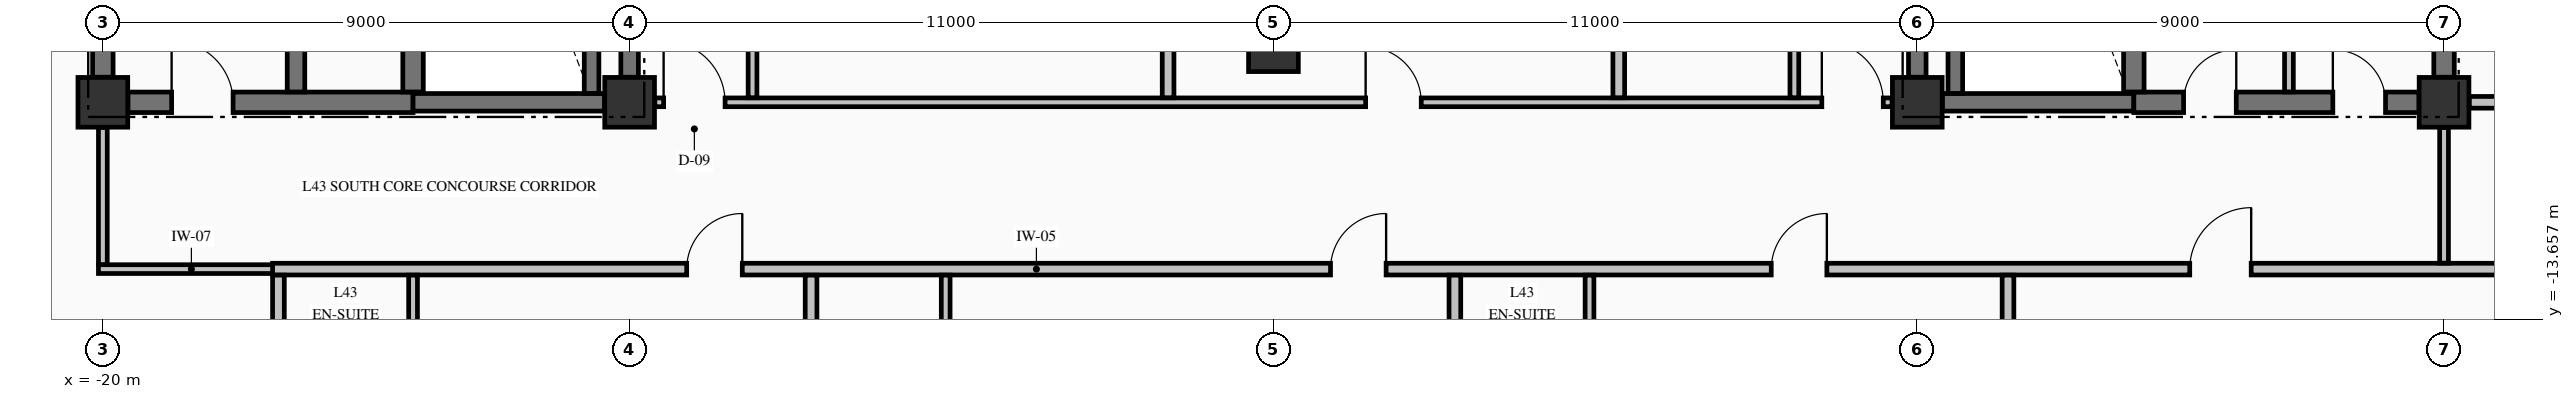
"""IFC4 building model, lengths in metres.
Left out: names, types, materials, properties, quantities, classifications, styles, units other than length and angle.
Written with IfcOpenShell. Run it as: python <this file> out.ifc"""

import sys

from ifc_helpers import new_model, si_unit, direction, frame, frame_2d, origin, origin_2d, place, context, subcontext, project, spatial, rectangle, extrude, element, fill, save


model = new_model("IFC4")
c1 = context("Model", 3, precision=1e-05, world=origin(), true_north=direction((0.0, 1.0)))
c2 = subcontext(c1, "Body", "Model", "MODEL_VIEW")
j1 = project(units=[si_unit("LENGTHUNIT", "METRE"), si_unit("PLANEANGLEUNIT", "RADIAN")], contexts=[c1])
p1 = place(None, origin())
s1 = spatial("IfcSite", under=j1, at=p1, CompositionType="ELEMENT")
p2 = place(p1, origin())
s2 = spatial("IfcBuilding", under=s1, at=p2, CompositionType="ELEMENT")
p3 = place(p2, frame((0.0, 0.0, 169.46)))
s3 = spatial("IfcBuildingStorey", under=s2, at=p3, CompositionType="ELEMENT", Elevation=169.46)
for number, where, z_axis, x_axis in (
    (1, (-20.0, -9.95, -0.25), (0.0, 0.0, 1.0), (1.0, 0.0, 0.0)),
    (2, (-11.0, -9.95, -0.25), (0.0, 0.0, 1.0), (1.0, 0.0, 0.0)),
    (3, (11.0, -9.95, -0.25), (0.0, 0.0, 1.0), (1.0, 0.0, 0.0)),
    (4, (20.0, -9.95, -0.25), (0.0, 0.0, 1.0), (1.0, 0.0, 0.0)),
    (5, (0.0, -9.0, -0.25), (0.0, 0.0, 1.0), (1.0, 0.0, 0.0)),
):
    element("IfcColumn", number, at=place(p3, frame(where, z_axis=z_axis, x_axis=x_axis)), inside=s3, PredefinedType="COLUMN", context=c2, shape_type="SweptSolid", body=[
        extrude(rectangle(XDim=0.85, YDim=0.85, at=origin_2d()), origin(), (0.0, 0.0, 1.0), 3.4),
    ])
p4 = place(p3, frame((-19.571, -9.95, 0.0), z_axis=(0.0, 0.0, 1.0), x_axis=(1.0, 0.0, 0.0)))
e6 = element("IfcWall", 6, at=p4, inside=s3, PredefinedType="SHEAR", context=c2, shape_type="SweptSolid", body=[
    extrude(rectangle(XDim=4.871, YDim=0.35, at=frame_2d((2.436, 0.0))), origin(), (0.0, 0.0, 1.0), 3.15),
])
p5 = place(p4, frame((0.746, 0.0, 0.0)))
e7 = element("IfcOpeningElement", 7, at=p5, cuts=e6, PredefinedType="OPENING", context=c2, shape_type="SweptSolid", body=[
    extrude(rectangle(XDim=1.05, YDim=2.15, at=frame_2d((0.525, 1.075))), frame((0.0, 0.185, 0.0), z_axis=(0.0, -1.0, 0.0), x_axis=(1.0, 0.0, 0.0)), (0.0, 0.0, 1.0), 0.37),
])
for number, where, z_axis, x_axis in (
    (8, (-14.7, -9.95, 0.0), (0.0, 0.0, 1.0), (1.0, 0.0, 0.0)),
    (9, (11.429, -9.95, 0.0), (0.0, 0.0, 1.0), (1.0, 0.0, 0.0)),
):
    element("IfcWall", number, at=place(p3, frame(where, z_axis=z_axis, x_axis=x_axis)), inside=s3, PredefinedType="SHEAR", context=c2, shape_type="SweptSolid", body=[
        extrude(rectangle(XDim=3.271, YDim=0.3, at=frame_2d((1.635, 0.0))), origin(), (0.0, 0.0, 1.0), 3.15),
    ])
p6 = place(p3, frame((14.7, -9.95, 0.0), z_axis=(0.0, 0.0, 1.0), x_axis=(1.0, 0.0, 0.0)))
e10 = element("IfcWall", 10, at=p6, inside=s3, PredefinedType="SHEAR", context=c2, shape_type="SweptSolid", body=[
    extrude(rectangle(XDim=4.871, YDim=0.35, at=frame_2d((2.436, 0.0))), origin(), (0.0, 0.0, 1.0), 3.15),
])
p7 = place(p6, frame((0.85, 0.0, 0.0)))
e11 = element("IfcOpeningElement", 11, at=p7, cuts=e10, PredefinedType="OPENING", context=c2, shape_type="SweptSolid", body=[
    extrude(rectangle(XDim=0.9, YDim=2.15, at=frame_2d((0.45, 1.075))), frame((0.0, 0.185, 0.0), z_axis=(0.0, -1.0, 0.0), x_axis=(1.0, 0.0, 0.0)), (0.0, 0.0, 1.0), 0.37),
])
p8 = place(p6, frame((3.4, 0.0, 0.0)))
e12 = element("IfcOpeningElement", 12, at=p8, cuts=e10, PredefinedType="OPENING", context=c2, shape_type="SweptSolid", body=[
    extrude(rectangle(XDim=0.9, YDim=2.15, at=frame_2d((0.45, 1.075))), frame((0.0, 0.185, 0.0), z_axis=(0.0, -1.0, 0.0), x_axis=(1.0, 0.0, 0.0)), (0.0, 0.0, 1.0), 0.37),
])
p9 = place(p3, frame((-20.075, -12.8, 0.0), z_axis=(0.0, 0.0, 1.0), x_axis=(1.0, 0.0, 0.0)))
e13 = element("IfcWall", 13, at=p9, inside=s3, PredefinedType="PARTITIONING", context=c2, shape_type="SweptSolid", body=[
    extrude(rectangle(XDim=3.175, YDim=0.15, at=frame_2d((1.587, 0.0))), origin(), (0.0, 0.0, 1.0), 3.15),
])
p10 = place(p3, frame((-17.1, -12.8, 0.0), z_axis=(0.0, 0.0, 1.0), x_axis=(1.0, 0.0, 0.0)))
e14 = element("IfcWall", 14, at=p10, inside=s3, PredefinedType="PARTITIONING", context=c2, shape_type="SweptSolid", body=[
    extrude(rectangle(XDim=39.2, YDim=0.2, at=frame_2d((19.6, 0.0))), origin(), (0.0, 0.0, 1.0), 3.15),
])
p11 = place(p10, frame((7.075, 0.0, 0.0)))
e15 = element("IfcOpeningElement", 15, at=p11, cuts=e14, PredefinedType="OPENING", context=c2, shape_type="SweptSolid", body=[
    extrude(rectangle(XDim=0.95, YDim=2.15, at=frame_2d((0.475, 1.075))), frame((0.0, 0.11, 0.0), z_axis=(0.0, -1.0, 0.0), x_axis=(1.0, 0.0, 0.0)), (0.0, 0.0, 1.0), 0.22),
])
p12 = place(p10, frame((18.075, 0.0, 0.0)))
e16 = element("IfcOpeningElement", 16, at=p12, cuts=e14, PredefinedType="OPENING", context=c2, shape_type="SweptSolid", body=[
    extrude(rectangle(XDim=0.95, YDim=2.15, at=frame_2d((0.475, 1.075))), frame((0.0, 0.11, 0.0), z_axis=(0.0, -1.0, 0.0), x_axis=(1.0, 0.0, 0.0)), (0.0, 0.0, 1.0), 0.22),
])
p13 = place(p10, frame((25.605, 0.0, 0.0)))
e17 = element("IfcOpeningElement", 17, at=p13, cuts=e14, PredefinedType="OPENING", context=c2, shape_type="SweptSolid", body=[
    extrude(rectangle(XDim=0.95, YDim=2.15, at=frame_2d((0.475, 1.075))), frame((0.0, 0.11, 0.0), z_axis=(0.0, -1.0, 0.0), x_axis=(1.0, 0.0, 0.0)), (0.0, 0.0, 1.0), 0.22),
])
p14 = place(p10, frame((32.755, 0.0, 0.0)))
e18 = element("IfcOpeningElement", 18, at=p14, cuts=e14, PredefinedType="OPENING", context=c2, shape_type="SweptSolid", body=[
    extrude(rectangle(XDim=1.05, YDim=2.15, at=frame_2d((0.525, 1.075))), frame((0.0, 0.11, 0.0), z_axis=(0.0, -1.0, 0.0), x_axis=(1.0, 0.0, 0.0)), (0.0, 0.0, 1.0), 0.22),
])
p15 = place(p3, frame((-10.569, -9.95, 0.0), z_axis=(0.0, 0.0, 1.0), x_axis=(1.0, 0.0, 0.0)))
e19 = element("IfcWall", 19, at=p15, inside=s3, PredefinedType="PARTITIONING", context=c2, shape_type="SweptSolid", body=[
    extrude(rectangle(XDim=21.138, YDim=0.15, at=frame_2d((10.569, 0.0))), origin(), (0.0, 0.0, 1.0), 3.15),
])
p16 = place(p15, frame((0.15, 0.0, 0.0)))
e20 = element("IfcOpeningElement", 20, at=p16, cuts=e19, PredefinedType="OPENING", context=c2, shape_type="SweptSolid", body=[
    extrude(rectangle(XDim=1.05, YDim=2.15, at=frame_2d((0.525, 1.075))), frame((0.0, 0.085, 0.0), z_axis=(0.0, -1.0, 0.0), x_axis=(1.0, 0.0, 0.0)), (0.0, 0.0, 1.0), 0.17),
])
p17 = place(p15, frame((19.938, 0.0, 0.0)))
e21 = element("IfcOpeningElement", 21, at=p17, cuts=e19, PredefinedType="OPENING", context=c2, shape_type="SweptSolid", body=[
    extrude(rectangle(XDim=1.05, YDim=2.15, at=frame_2d((0.525, 1.075))), frame((0.0, 0.085, 0.0), z_axis=(0.0, -1.0, 0.0), x_axis=(1.0, 0.0, 0.0)), (0.0, 0.0, 1.0), 0.17),
])
p18 = place(p15, frame((12.144, 0.0, 0.0)))
e22 = element("IfcOpeningElement", 22, at=p18, cuts=e19, PredefinedType="OPENING", context=c2, shape_type="SweptSolid", body=[
    extrude(rectangle(XDim=0.95, YDim=2.15, at=frame_2d((0.475, 1.075))), frame((0.0, 0.085, 0.0), z_axis=(0.0, -1.0, 0.0), x_axis=(1.0, 0.0, 0.0)), (0.0, 0.0, 1.0), 0.17),
])
p19 = place(p3, frame((20.431, -9.95, 0.0), z_axis=(0.0, 0.0, 1.0), x_axis=(1.0, 0.0, 0.0)))
e23 = element("IfcWall", 23, at=p19, inside=s3, PredefinedType="PARTITIONING", context=c2, shape_type="SweptSolid", body=[
    extrude(rectangle(XDim=6.404, YDim=0.2, at=frame_2d((3.202, 0.0))), origin(), (0.0, 0.0, 1.0), 3.15),
])
p20 = place(p3, frame((-20.0, -9.521, 0.0), z_axis=(0.0, 0.0, 1.0), x_axis=(0.0, 1.0, 0.0)))
e24 = element("IfcWall", 24, at=p20, inside=s3, PredefinedType="SHEAR", context=c2, shape_type="SweptSolid", body=[
    extrude(rectangle(XDim=9.092, YDim=0.35, at=frame_2d((4.546, 0.0))), origin(), (0.0, 0.0, 1.0), 3.15),
])
p21 = place(p3, frame((-16.7, -9.773, 0.0), z_axis=(0.0, 0.0, 1.0), x_axis=(0.0, 1.0, 0.0)))
e25 = element("IfcWall", 25, at=p21, inside=s3, PredefinedType="SHEAR", context=c2, shape_type="SweptSolid", body=[
    extrude(rectangle(XDim=9.371, YDim=0.3, at=frame_2d((4.686, 0.0))), origin(), (0.0, 0.0, 1.0), 3.15),
])
p22 = place(p3, frame((-14.7, -9.773, 0.0), z_axis=(0.0, 0.0, 1.0), x_axis=(0.0, 1.0, 0.0)))
e26 = element("IfcWall", 26, at=p22, inside=s3, PredefinedType="SHEAR", context=c2, shape_type="SweptSolid", body=[
    extrude(rectangle(XDim=9.371, YDim=0.35, at=frame_2d((4.686, 0.0))), origin(), (0.0, 0.0, 1.0), 3.15),
])
p23 = place(p3, frame((-11.65, -9.798, 0.0), z_axis=(0.0, 0.0, 1.0), x_axis=(0.0, 1.0, 0.0)))
e27 = element("IfcWall", 27, at=p23, inside=s3, PredefinedType="SOLIDWALL", context=c2, shape_type="SweptSolid", body=[
    extrude(rectangle(XDim=9.396, YDim=0.25, at=frame_2d((4.698, 0.0))), origin(), (0.0, 0.0, 1.0), 3.15),
])
for number, where, z_axis, x_axis in (
    (28, (-11.0, -9.521, 0.0), (0.0, 0.0, 1.0), (0.0, 1.0, 0.0)),
    (29, (11.0, -9.521, 0.0), (0.0, 0.0, 1.0), (0.0, 1.0, 0.0)),
):
    element("IfcWall", number, at=place(p3, frame(where, z_axis=z_axis, x_axis=x_axis)), inside=s3, PredefinedType="SHEAR", context=c2, shape_type="SweptSolid", body=[
        extrude(rectangle(XDim=9.092, YDim=0.3, at=frame_2d((4.546, 0.0))), origin(), (0.0, 0.0, 1.0), 3.15),
    ])
p24 = place(p3, frame((11.65, -9.798, 0.0), z_axis=(0.0, 0.0, 1.0), x_axis=(0.0, 1.0, 0.0)))
e30 = element("IfcWall", 30, at=p24, inside=s3, PredefinedType="SOLIDWALL", context=c2, shape_type="SweptSolid", body=[
    extrude(rectangle(XDim=9.396, YDim=0.25, at=frame_2d((4.698, 0.0))), origin(), (0.0, 0.0, 1.0), 3.15),
])
p25 = place(p3, frame((14.7, -9.773, 0.0), z_axis=(0.0, 0.0, 1.0), x_axis=(0.0, 1.0, 0.0)))
e31 = element("IfcWall", 31, at=p25, inside=s3, PredefinedType="SHEAR", context=c2, shape_type="SweptSolid", body=[
    extrude(rectangle(XDim=9.371, YDim=0.35, at=frame_2d((4.686, 0.0))), origin(), (0.0, 0.0, 1.0), 3.15),
])
p26 = place(p3, frame((20.0, -9.521, 0.0), z_axis=(0.0, 0.0, 1.0), x_axis=(0.0, 1.0, 0.0)))
e32 = element("IfcWall", 32, at=p26, inside=s3, PredefinedType="SHEAR", context=c2, shape_type="SweptSolid", body=[
    extrude(rectangle(XDim=9.092, YDim=0.35, at=frame_2d((4.546, 0.0))), origin(), (0.0, 0.0, 1.0), 3.15),
])
p27 = place(p3, frame((-20.0, -12.722, 0.0), z_axis=(0.0, 0.0, 1.0), x_axis=(0.0, 1.0, 0.0)))
e33 = element("IfcWall", 33, at=p27, inside=s3, PredefinedType="PARTITIONING", context=c2, shape_type="SweptSolid", body=[
    extrude(rectangle(XDim=2.341, YDim=0.15, at=frame_2d((1.17, 0.0))), origin(), (0.0, 0.0, 1.0), 2.342),
])
p28 = place(p3, frame((-17.0, -15.672, 0.0), z_axis=(0.0, 0.0, 1.0), x_axis=(0.0, 1.0, 0.0)))
e34 = element("IfcWall", 34, at=p28, inside=s3, PredefinedType="PARTITIONING", context=c2, shape_type="SweptSolid", body=[
    extrude(rectangle(XDim=2.769, YDim=0.2, at=frame_2d((1.385, 0.0))), origin(), (0.0, 0.0, 1.0), 3.15),
])
p29 = place(p3, frame((-14.7, -15.672, 0.0), z_axis=(0.0, 0.0, 1.0), x_axis=(0.0, 1.0, 0.0)))
e35 = element("IfcWall", 35, at=p29, inside=s3, PredefinedType="PARTITIONING", context=c2, shape_type="SweptSolid", body=[
    extrude(rectangle(XDim=2.769, YDim=0.15, at=frame_2d((1.385, 0.0))), origin(), (0.0, 0.0, 1.0), 3.15),
])
p30 = place(p3, frame((-8.9, -9.872, 0.0), z_axis=(0.0, 0.0, 1.0), x_axis=(0.0, 1.0, 0.0)))
e36 = element("IfcWall", 36, at=p30, inside=s3, PredefinedType="PARTITIONING", context=c2, shape_type="SweptSolid", body=[
    extrude(rectangle(XDim=7.169, YDim=0.15, at=frame_2d((3.584, 0.0))), origin(), (0.0, 0.0, 1.0), 3.15),
])
p31 = place(p30, frame((3.102, 0.0, 0.0)))
e37 = element("IfcOpeningElement", 37, at=p31, cuts=e36, PredefinedType="OPENING", context=c2, shape_type="SweptSolid", body=[
    extrude(rectangle(XDim=1.0, YDim=2.15, at=frame_2d((0.5, 1.075))), frame((0.0, 0.085, 0.0), z_axis=(0.0, -1.0, 0.0), x_axis=(1.0, 0.0, 0.0)), (0.0, 0.0, 1.0), 0.17),
])
p32 = place(p3, frame((-7.9, -14.972, 0.0), z_axis=(0.0, 0.0, 1.0), x_axis=(0.0, 1.0, 0.0)))
e38 = element("IfcWall", 38, at=p32, inside=s3, PredefinedType="PARTITIONING", context=c2, shape_type="SweptSolid", body=[
    extrude(rectangle(XDim=2.069, YDim=0.2, at=frame_2d((1.034, 0.0))), origin(), (0.0, 0.0, 1.0), 3.15),
])
p33 = place(p3, frame((-5.6, -14.972, 0.0), z_axis=(0.0, 0.0, 1.0), x_axis=(0.0, 1.0, 0.0)))
e39 = element("IfcWall", 39, at=p33, inside=s3, PredefinedType="PARTITIONING", context=c2, shape_type="SweptSolid", body=[
    extrude(rectangle(XDim=2.069, YDim=0.15, at=frame_2d((1.034, 0.0))), origin(), (0.0, 0.0, 1.0), 3.15),
])
p34 = place(p3, frame((-1.8, -9.872, 0.0), z_axis=(0.0, 0.0, 1.0), x_axis=(0.0, 1.0, 0.0)))
e40 = element("IfcWall", 40, at=p34, inside=s3, PredefinedType="PARTITIONING", context=c2, shape_type="SweptSolid", body=[
    extrude(rectangle(XDim=4.569, YDim=0.2, at=frame_2d((2.285, 0.0))), origin(), (0.0, 0.0, 1.0), 3.15),
])
p35 = place(p3, frame((3.1, -15.672, 0.0), z_axis=(0.0, 0.0, 1.0), x_axis=(0.0, 1.0, 0.0)))
e41 = element("IfcWall", 41, at=p35, inside=s3, PredefinedType="PARTITIONING", context=c2, shape_type="SweptSolid", body=[
    extrude(rectangle(XDim=2.769, YDim=0.2, at=frame_2d((1.385, 0.0))), origin(), (0.0, 0.0, 1.0), 3.15),
])
p36 = place(p3, frame((5.4, -15.672, 0.0), z_axis=(0.0, 0.0, 1.0), x_axis=(0.0, 1.0, 0.0)))
e42 = element("IfcWall", 42, at=p36, inside=s3, PredefinedType="PARTITIONING", context=c2, shape_type="SweptSolid", body=[
    extrude(rectangle(XDim=2.769, YDim=0.15, at=frame_2d((1.385, 0.0))), origin(), (0.0, 0.0, 1.0), 3.15),
])
p37 = place(p3, frame((5.9, -9.872, 0.0), z_axis=(0.0, 0.0, 1.0), x_axis=(0.0, 1.0, 0.0)))
e43 = element("IfcWall", 43, at=p37, inside=s3, PredefinedType="PARTITIONING", context=c2, shape_type="SweptSolid", body=[
    extrude(rectangle(XDim=4.569, YDim=0.2, at=frame_2d((2.285, 0.0))), origin(), (0.0, 0.0, 1.0), 3.15),
])
p38 = place(p3, frame((8.9, -9.872, 0.0), z_axis=(0.0, 0.0, 1.0), x_axis=(0.0, 1.0, 0.0)))
e44 = element("IfcWall", 44, at=p38, inside=s3, PredefinedType="PARTITIONING", context=c2, shape_type="SweptSolid", body=[
    extrude(rectangle(XDim=4.569, YDim=0.15, at=frame_2d((2.285, 0.0))), origin(), (0.0, 0.0, 1.0), 3.15),
])
p39 = place(p38, frame((1.847, 0.0, 0.0)))
e45 = element("IfcOpeningElement", 45, at=p39, cuts=e44, PredefinedType="OPENING", context=c2, shape_type="SweptSolid", body=[
    extrude(rectangle(XDim=0.95, YDim=2.15, at=frame_2d((0.475, 1.075))), frame((0.0, 0.085, 0.0), z_axis=(0.0, -1.0, 0.0), x_axis=(1.0, 0.0, 0.0)), (0.0, 0.0, 1.0), 0.17),
])
p40 = place(p3, frame((12.55, -24.335, 0.0), z_axis=(0.0, 0.0, 1.0), x_axis=(0.0, 1.0, 0.0)))
e46 = element("IfcWall", 46, at=p40, inside=s3, PredefinedType="PARTITIONING", context=c2, shape_type="SweptSolid", body=[
    extrude(rectangle(XDim=11.432, YDim=0.2, at=frame_2d((5.716, 0.0))), origin(), (0.0, 0.0, 1.0), 3.15),
])
p41 = place(p3, frame((17.35, -9.772, 0.0), z_axis=(0.0, 0.0, 1.0), x_axis=(0.0, 1.0, 0.0)))
e47 = element("IfcWall", 47, at=p41, inside=s3, PredefinedType="PARTITIONING", context=c2, shape_type="SweptSolid", body=[
    extrude(rectangle(XDim=14.494, YDim=0.15, at=frame_2d((7.247, 0.0))), origin(), (0.0, 0.0, 1.0), 3.15),
])
p42 = place(p3, frame((20.0, -12.697, 0.0), z_axis=(0.0, 0.0, 1.0), x_axis=(0.0, 1.0, 0.0)))
e48 = element("IfcWall", 48, at=p42, inside=s3, PredefinedType="PARTITIONING", context=c2, shape_type="SweptSolid", body=[
    extrude(rectangle(XDim=2.316, YDim=0.15, at=frame_2d((1.158, 0.0))), origin(), (0.0, 0.0, 1.0), 2.342),
])
p43 = place(p5, origin())
e49 = element("IfcDoor", 49, at=p43, inside=s3, OperationType="SINGLE_SWING_LEFT", PredefinedType="DOOR", context=c2, shape_type="SweptSolid", body=[
    extrude(rectangle(XDim=1.05, YDim=2.15, at=frame_2d((0.525, 1.075))), frame((0.0, 0.025, 0.0), z_axis=(0.0, -1.0, 0.0), x_axis=(1.0, 0.0, 0.0)), (0.0, 0.0, 1.0), 0.05),
])
fill(e7, e49)
p44 = place(p7, origin())
e50 = element("IfcDoor", 50, at=p44, inside=s3, OperationType="SINGLE_SWING_RIGHT", PredefinedType="DOOR", context=c2, shape_type="SweptSolid", body=[
    extrude(rectangle(XDim=0.9, YDim=2.15, at=frame_2d((0.45, 1.075))), frame((0.0, 0.025, 0.0), z_axis=(0.0, -1.0, 0.0), x_axis=(1.0, 0.0, 0.0)), (0.0, 0.0, 1.0), 0.05),
])
fill(e11, e50)
p45 = place(p8, origin())
e51 = element("IfcDoor", 51, at=p45, inside=s3, OperationType="SINGLE_SWING_LEFT", PredefinedType="DOOR", context=c2, shape_type="SweptSolid", body=[
    extrude(rectangle(XDim=0.9, YDim=2.15, at=frame_2d((0.45, 1.075))), frame((0.0, 0.025, 0.0), z_axis=(0.0, -1.0, 0.0), x_axis=(1.0, 0.0, 0.0)), (0.0, 0.0, 1.0), 0.05),
])
fill(e12, e51)
p46 = place(p16, origin())
e52 = element("IfcDoor", 52, at=p46, inside=s3, OperationType="SINGLE_SWING_LEFT", PredefinedType="DOOR", context=c2, shape_type="SweptSolid", body=[
    extrude(rectangle(XDim=1.05, YDim=2.15, at=frame_2d((0.525, 1.075))), frame((0.0, 0.025, 0.0), z_axis=(0.0, -1.0, 0.0), x_axis=(1.0, 0.0, 0.0)), (0.0, 0.0, 1.0), 0.05),
])
fill(e20, e52)
p47 = place(p17, origin())
e53 = element("IfcDoor", 53, at=p47, inside=s3, OperationType="SINGLE_SWING_LEFT", PredefinedType="DOOR", context=c2, shape_type="SweptSolid", body=[
    extrude(rectangle(XDim=1.05, YDim=2.15, at=frame_2d((0.525, 1.075))), frame((0.0, 0.025, 0.0), z_axis=(0.0, -1.0, 0.0), x_axis=(1.0, 0.0, 0.0)), (0.0, 0.0, 1.0), 0.05),
])
fill(e21, e53)
p48 = place(p11, origin())
e54 = element("IfcDoor", 54, at=p48, inside=s3, OperationType="SINGLE_SWING_RIGHT", PredefinedType="DOOR", context=c2, shape_type="SweptSolid", body=[
    extrude(rectangle(XDim=0.95, YDim=2.15, at=frame_2d((0.475, 1.075))), frame((0.0, 0.025, 0.0), z_axis=(0.0, -1.0, 0.0), x_axis=(1.0, 0.0, 0.0)), (0.0, 0.0, 1.0), 0.05),
])
fill(e15, e54)
p49 = place(p12, origin())
e55 = element("IfcDoor", 55, at=p49, inside=s3, OperationType="SINGLE_SWING_RIGHT", PredefinedType="DOOR", context=c2, shape_type="SweptSolid", body=[
    extrude(rectangle(XDim=0.95, YDim=2.15, at=frame_2d((0.475, 1.075))), frame((0.0, 0.025, 0.0), z_axis=(0.0, -1.0, 0.0), x_axis=(1.0, 0.0, 0.0)), (0.0, 0.0, 1.0), 0.05),
])
fill(e16, e55)
p50 = place(p13, origin())
e56 = element("IfcDoor", 56, at=p50, inside=s3, OperationType="SINGLE_SWING_RIGHT", PredefinedType="DOOR", context=c2, shape_type="SweptSolid", body=[
    extrude(rectangle(XDim=0.95, YDim=2.15, at=frame_2d((0.475, 1.075))), frame((0.0, 0.025, 0.0), z_axis=(0.0, -1.0, 0.0), x_axis=(1.0, 0.0, 0.0)), (0.0, 0.0, 1.0), 0.05),
])
fill(e17, e56)
p51 = place(p14, origin())
e57 = element("IfcDoor", 57, at=p51, inside=s3, OperationType="SINGLE_SWING_RIGHT", PredefinedType="DOOR", context=c2, shape_type="SweptSolid", body=[
    extrude(rectangle(XDim=1.05, YDim=2.15, at=frame_2d((0.525, 1.075))), frame((0.0, 0.025, 0.0), z_axis=(0.0, -1.0, 0.0), x_axis=(1.0, 0.0, 0.0)), (0.0, 0.0, 1.0), 0.05),
])
fill(e18, e57)
p52 = place(p18, origin())
e58 = element("IfcDoor", 58, at=p52, inside=s3, OperationType="SINGLE_SWING_LEFT", PredefinedType="DOOR", context=c2, shape_type="SweptSolid", body=[
    extrude(rectangle(XDim=0.95, YDim=2.15, at=frame_2d((0.475, 1.075))), frame((0.0, 0.025, 0.0), z_axis=(0.0, -1.0, 0.0), x_axis=(1.0, 0.0, 0.0)), (0.0, 0.0, 1.0), 0.05),
])
fill(e22, e58)
save(model, sys.argv[1])
